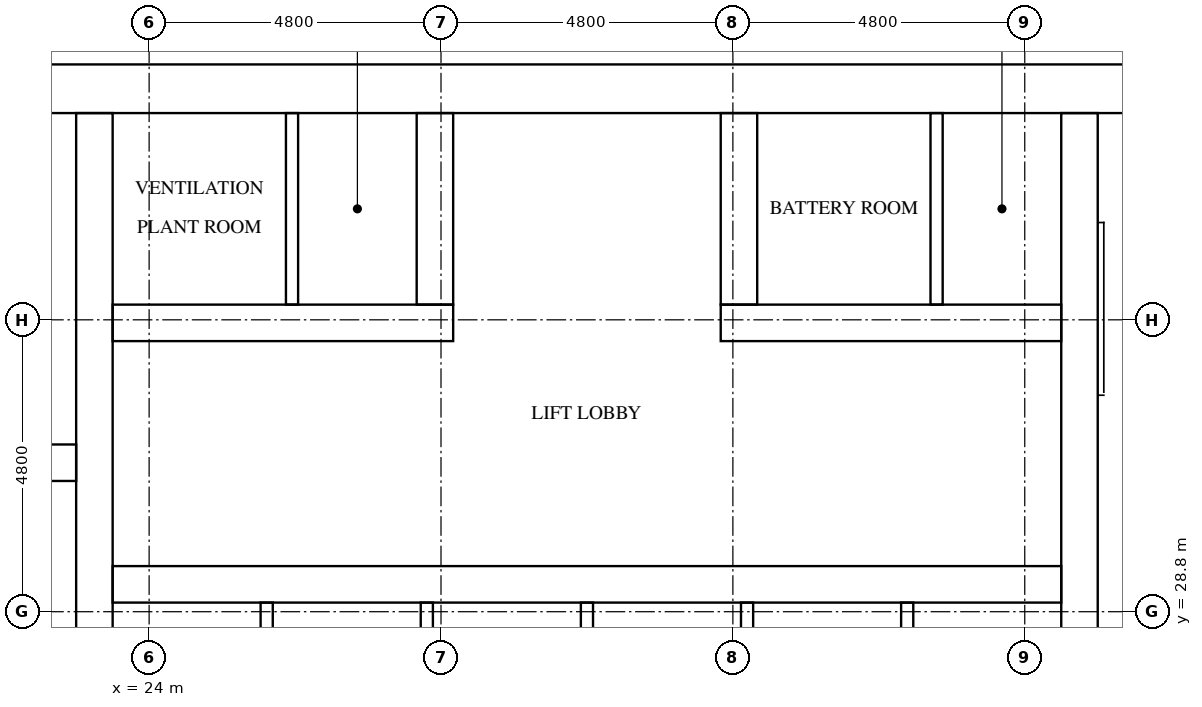
"""IFC4 building model, lengths in metres.
Left out: names, types, materials, properties, quantities, classifications, styles, units other than length and angle.
Written with IfcOpenShell. Run it as: python <this file> out.ifc"""

import sys

from ifc_helpers import new_model, si_unit, direction, frame, frame_2d, origin, place, context, subcontext, project, spatial, rectangle, extrude, element, fill, save


model = new_model("IFC4")
c1 = context("Model", 3, precision=1e-05, world=origin(), true_north=direction((0.0, 1.0)))
c2 = subcontext(c1, "Body", "Model", "MODEL_VIEW")
j1 = project(units=[si_unit("LENGTHUNIT", "METRE"), si_unit("PLANEANGLEUNIT", "RADIAN")], contexts=[c1])
p1 = place(None, origin())
s1 = spatial("IfcSite", under=j1, at=p1, CompositionType="ELEMENT")
p2 = place(p1, origin())
s2 = spatial("IfcBuilding", under=s1, at=p2, CompositionType="ELEMENT")
p3 = place(p2, frame((0.0, 0.0, 159.5)))
s3 = spatial("IfcBuildingStorey", under=s2, at=p3, CompositionType="ELEMENT", Elevation=159.5)
p4 = place(p3, frame((15.0, 37.4, 0.0), z_axis=(0.0, 0.0, 1.0), x_axis=(1.0, 0.0, 0.0)))
e1 = element("IfcWall", 1, at=p4, inside=s3, PredefinedType="SHEAR", context=c2, shape_type="SweptSolid", body=[
    extrude(rectangle(XDim=32.4, YDim=0.8, at=frame_2d((16.2, 0.0))), origin(), (0.0, 0.0, 1.0), 3.2),
])
p5 = place(p4, frame((15.3, 0.0, 0.0)))
e2 = element("IfcOpeningElement", 2, at=p5, cuts=e1, PredefinedType="OPENING", context=c2, shape_type="SweptSolid", body=[
    extrude(rectangle(XDim=1.8, YDim=2.1, at=frame_2d((0.9, 1.05))), frame((0.0, 0.41, 0.0), z_axis=(0.0, -1.0, 0.0), x_axis=(1.0, 0.0, 0.0)), (0.0, 0.0, 1.0), 0.82),
])
p6 = place(p4, frame((1.51, 0.0, 0.0)))
e3 = element("IfcOpeningElement", 3, at=p6, cuts=e1, PredefinedType="OPENING", context=c2, shape_type="SweptSolid", body=[
    extrude(rectangle(XDim=1.0, YDim=2.1, at=frame_2d((0.5, 1.05))), frame((0.0, 0.41, 0.0), z_axis=(0.0, -1.0, 0.0), x_axis=(1.0, 0.0, 0.0)), (0.0, 0.0, 1.0), 0.82),
])
p7 = place(p4, frame((5.11, 0.0, 0.0)))
e4 = element("IfcOpeningElement", 4, at=p7, cuts=e1, PredefinedType="OPENING", context=c2, shape_type="SweptSolid", body=[
    extrude(rectangle(XDim=1.0, YDim=2.1, at=frame_2d((0.5, 1.05))), frame((0.0, 0.41, 0.0), z_axis=(0.0, -1.0, 0.0), x_axis=(1.0, 0.0, 0.0)), (0.0, 0.0, 1.0), 0.82),
])
p8 = place(p3, frame((23.1, 15.8, 0.0), z_axis=(0.0, 0.0, 1.0), x_axis=(0.0, 1.0, 0.0)))
e5 = element("IfcWall", 5, at=p8, inside=s3, PredefinedType="SHEAR", context=c2, shape_type="SweptSolid", body=[
    extrude(rectangle(XDim=21.2, YDim=0.6, at=frame_2d((10.6, 0.0))), origin(), (0.0, 0.0, 1.0), 3.2),
])
p9 = place(p3, frame((39.3, 27.75, 0.0), z_axis=(0.0, 0.0, 1.0), x_axis=(0.0, 1.0, 0.0)))
e6 = element("IfcWall", 6, at=p9, inside=s3, PredefinedType="SHEAR", context=c2, shape_type="SweptSolid", body=[
    extrude(rectangle(XDim=9.25, YDim=0.6, at=frame_2d((4.625, 0.0))), origin(), (0.0, 0.0, 1.0), 3.2),
])
p10 = place(p3, frame((15.8, 31.25, 0.0), z_axis=(0.0, 0.0, 1.0), x_axis=(1.0, 0.0, 0.0)))
e7 = element("IfcWall", 7, at=p10, inside=s3, PredefinedType="SHEAR", context=c2, shape_type="SweptSolid", body=[
    extrude(rectangle(XDim=7.0, YDim=0.6, at=frame_2d((3.5, 0.0))), origin(), (0.0, 0.0, 1.0), 3.2),
])
p11 = place(p3, frame((23.4, 29.25, 0.0), z_axis=(0.0, 0.0, 1.0), x_axis=(1.0, 0.0, 0.0)))
e8 = element("IfcWall", 8, at=p11, inside=s3, PredefinedType="SHEAR", context=c2, shape_type="SweptSolid", body=[
    extrude(rectangle(XDim=15.6, YDim=0.6, at=frame_2d((7.8, 0.0))), origin(), (0.0, 0.0, 1.0), 3.2),
])
p12 = place(p11, frame((0.667, 0.0, 0.0)))
e9 = element("IfcOpeningElement", 9, at=p12, cuts=e8, PredefinedType="OPENING", context=c2, shape_type="SweptSolid", body=[
    extrude(rectangle(XDim=1.1, YDim=2.1, at=frame_2d((0.55, 1.05))), frame((0.0, 0.31, 0.0), z_axis=(0.0, -1.0, 0.0), x_axis=(1.0, 0.0, 0.0)), (0.0, 0.0, 1.0), 0.62),
])
p13 = place(p11, frame((3.3, 0.0, 0.0)))
e10 = element("IfcOpeningElement", 10, at=p13, cuts=e8, PredefinedType="OPENING", context=c2, shape_type="SweptSolid", body=[
    extrude(rectangle(XDim=1.1, YDim=2.1, at=frame_2d((0.55, 1.05))), frame((0.0, 0.31, 0.0), z_axis=(0.0, -1.0, 0.0), x_axis=(1.0, 0.0, 0.0)), (0.0, 0.0, 1.0), 0.62),
])
p14 = place(p11, frame((5.933, 0.0, 0.0)))
e11 = element("IfcOpeningElement", 11, at=p14, cuts=e8, PredefinedType="OPENING", context=c2, shape_type="SweptSolid", body=[
    extrude(rectangle(XDim=1.1, YDim=2.1, at=frame_2d((0.55, 1.05))), frame((0.0, 0.31, 0.0), z_axis=(0.0, -1.0, 0.0), x_axis=(1.0, 0.0, 0.0)), (0.0, 0.0, 1.0), 0.62),
])
p15 = place(p11, frame((8.567, 0.0, 0.0)))
e12 = element("IfcOpeningElement", 12, at=p15, cuts=e8, PredefinedType="OPENING", context=c2, shape_type="SweptSolid", body=[
    extrude(rectangle(XDim=1.1, YDim=2.1, at=frame_2d((0.55, 1.05))), frame((0.0, 0.31, 0.0), z_axis=(0.0, -1.0, 0.0), x_axis=(1.0, 0.0, 0.0)), (0.0, 0.0, 1.0), 0.62),
])
p16 = place(p11, frame((11.2, 0.0, 0.0)))
e13 = element("IfcOpeningElement", 13, at=p16, cuts=e8, PredefinedType="OPENING", context=c2, shape_type="SweptSolid", body=[
    extrude(rectangle(XDim=1.1, YDim=2.1, at=frame_2d((0.55, 1.05))), frame((0.0, 0.31, 0.0), z_axis=(0.0, -1.0, 0.0), x_axis=(1.0, 0.0, 0.0)), (0.0, 0.0, 1.0), 0.62),
])
p17 = place(p11, frame((13.833, 0.0, 0.0)))
e14 = element("IfcOpeningElement", 14, at=p17, cuts=e8, PredefinedType="OPENING", context=c2, shape_type="SweptSolid", body=[
    extrude(rectangle(XDim=1.1, YDim=2.1, at=frame_2d((0.55, 1.05))), frame((0.0, 0.31, 0.0), z_axis=(0.0, -1.0, 0.0), x_axis=(1.0, 0.0, 0.0)), (0.0, 0.0, 1.0), 0.62),
])
p18 = place(p3, frame((23.4, 33.55, 0.0), z_axis=(0.0, 0.0, 1.0), x_axis=(1.0, 0.0, 0.0)))
e15 = element("IfcWall", 15, at=p18, inside=s3, PredefinedType="SHEAR", context=c2, shape_type="SweptSolid", body=[
    extrude(rectangle(XDim=5.6, YDim=0.6, at=frame_2d((2.8, 0.0))), origin(), (0.0, 0.0, 1.0), 3.2),
])
p19 = place(p18, frame((0.925, 0.0, 0.0)))
e16 = element("IfcOpeningElement", 16, at=p19, cuts=e15, PredefinedType="OPENING", context=c2, shape_type="SweptSolid", body=[
    extrude(rectangle(XDim=1.0, YDim=2.1, at=frame_2d((0.5, 1.05))), frame((0.0, 0.31, 0.0), z_axis=(0.0, -1.0, 0.0), x_axis=(1.0, 0.0, 0.0)), (0.0, 0.0, 1.0), 0.62),
])
p20 = place(p18, frame((3.525, 0.0, 0.0)))
e17 = element("IfcOpeningElement", 17, at=p20, cuts=e15, PredefinedType="OPENING", context=c2, shape_type="SweptSolid", body=[
    extrude(rectangle(XDim=1.0, YDim=2.1, at=frame_2d((0.5, 1.05))), frame((0.0, 0.31, 0.0), z_axis=(0.0, -1.0, 0.0), x_axis=(1.0, 0.0, 0.0)), (0.0, 0.0, 1.0), 0.62),
])
p21 = place(p3, frame((33.4, 33.55, 0.0), z_axis=(0.0, 0.0, 1.0), x_axis=(1.0, 0.0, 0.0)))
e18 = element("IfcWall", 18, at=p21, inside=s3, PredefinedType="SHEAR", context=c2, shape_type="SweptSolid", body=[
    extrude(rectangle(XDim=5.6, YDim=0.6, at=frame_2d((2.8, 0.0))), origin(), (0.0, 0.0, 1.0), 3.2),
])
p22 = place(p21, frame((1.525, 0.0, 0.0)))
e19 = element("IfcOpeningElement", 19, at=p22, cuts=e18, PredefinedType="OPENING", context=c2, shape_type="SweptSolid", body=[
    extrude(rectangle(XDim=1.0, YDim=2.1, at=frame_2d((0.5, 1.05))), frame((0.0, 0.31, 0.0), z_axis=(0.0, -1.0, 0.0), x_axis=(1.0, 0.0, 0.0)), (0.0, 0.0, 1.0), 0.62),
])
p23 = place(p21, frame((4.125, 0.0, 0.0)))
e20 = element("IfcOpeningElement", 20, at=p23, cuts=e18, PredefinedType="OPENING", context=c2, shape_type="SweptSolid", body=[
    extrude(rectangle(XDim=1.0, YDim=2.1, at=frame_2d((0.5, 1.05))), frame((0.0, 0.31, 0.0), z_axis=(0.0, -1.0, 0.0), x_axis=(1.0, 0.0, 0.0)), (0.0, 0.0, 1.0), 0.62),
])
for number, where, z_axis, x_axis in (
    (21, (28.7, 33.85, 0.0), (0.0, 0.0, 1.0), (0.0, 1.0, 0.0)),
    (22, (33.7, 33.85, 0.0), (0.0, 0.0, 1.0), (0.0, 1.0, 0.0)),
):
    element("IfcWall", number, at=place(p3, frame(where, z_axis=z_axis, x_axis=x_axis)), inside=s3, PredefinedType="SHEAR", context=c2, shape_type="SweptSolid", body=[
        extrude(rectangle(XDim=3.15, YDim=0.6, at=frame_2d((1.575, 0.0))), origin(), (0.0, 0.0, 1.0), 3.2),
    ])
for number, where, z_axis, x_axis in (
    (23, (25.933, 26.45, 0.0), (0.0, 0.0, 1.0), (0.0, 1.0, 0.0)),
    (24, (28.567, 26.45, 0.0), (0.0, 0.0, 1.0), (0.0, 1.0, 0.0)),
    (25, (31.2, 26.45, 0.0), (0.0, 0.0, 1.0), (0.0, 1.0, 0.0)),
    (26, (33.833, 26.45, 0.0), (0.0, 0.0, 1.0), (0.0, 1.0, 0.0)),
    (27, (36.467, 26.45, 0.0), (0.0, 0.0, 1.0), (0.0, 1.0, 0.0)),
):
    element("IfcWall", number, at=place(p3, frame(where, z_axis=z_axis, x_axis=x_axis)), inside=s3, PredefinedType="SOLIDWALL", context=c2, shape_type="SweptSolid", body=[
        extrude(rectangle(XDim=2.5, YDim=0.2, at=frame_2d((1.25, 0.0))), origin(), (0.0, 0.0, 1.0), 3.2),
    ])
for number, where, z_axis, x_axis in (
    (28, (26.35, 33.85, 0.0), (0.0, 0.0, 1.0), (0.0, 1.0, 0.0)),
    (29, (36.95, 33.85, 0.0), (0.0, 0.0, 1.0), (0.0, 1.0, 0.0)),
):
    element("IfcWall", number, at=place(p3, frame(where, z_axis=z_axis, x_axis=x_axis)), inside=s3, PredefinedType="PARTITIONING", context=c2, shape_type="SweptSolid", body=[
        extrude(rectangle(XDim=3.15, YDim=0.2, at=frame_2d((1.575, 0.0))), origin(), (0.0, 0.0, 1.0), 3.2),
    ])
p24 = place(p12, origin())
e30 = element("IfcDoor", 30, at=p24, inside=s3, OperationType="DOUBLE_DOOR_SLIDING", PredefinedType="DOOR", context=c2, shape_type="SweptSolid", body=[
    extrude(rectangle(XDim=1.1, YDim=2.1, at=frame_2d((0.55, 1.05))), frame((0.0, 0.025, 0.0), z_axis=(0.0, -1.0, 0.0), x_axis=(1.0, 0.0, 0.0)), (0.0, 0.0, 1.0), 0.05),
])
fill(e9, e30)
p25 = place(p13, origin())
e31 = element("IfcDoor", 31, at=p25, inside=s3, OperationType="DOUBLE_DOOR_SLIDING", PredefinedType="DOOR", context=c2, shape_type="SweptSolid", body=[
    extrude(rectangle(XDim=1.1, YDim=2.1, at=frame_2d((0.55, 1.05))), frame((0.0, 0.025, 0.0), z_axis=(0.0, -1.0, 0.0), x_axis=(1.0, 0.0, 0.0)), (0.0, 0.0, 1.0), 0.05),
])
fill(e10, e31)
p26 = place(p14, origin())
e32 = element("IfcDoor", 32, at=p26, inside=s3, OperationType="DOUBLE_DOOR_SLIDING", PredefinedType="DOOR", context=c2, shape_type="SweptSolid", body=[
    extrude(rectangle(XDim=1.1, YDim=2.1, at=frame_2d((0.55, 1.05))), frame((0.0, 0.025, 0.0), z_axis=(0.0, -1.0, 0.0), x_axis=(1.0, 0.0, 0.0)), (0.0, 0.0, 1.0), 0.05),
])
fill(e11, e32)
p27 = place(p15, origin())
e33 = element("IfcDoor", 33, at=p27, inside=s3, OperationType="DOUBLE_DOOR_SLIDING", PredefinedType="DOOR", context=c2, shape_type="SweptSolid", body=[
    extrude(rectangle(XDim=1.1, YDim=2.1, at=frame_2d((0.55, 1.05))), frame((0.0, 0.025, 0.0), z_axis=(0.0, -1.0, 0.0), x_axis=(1.0, 0.0, 0.0)), (0.0, 0.0, 1.0), 0.05),
])
fill(e12, e33)
p28 = place(p16, origin())
e34 = element("IfcDoor", 34, at=p28, inside=s3, OperationType="DOUBLE_DOOR_SLIDING", PredefinedType="DOOR", context=c2, shape_type="SweptSolid", body=[
    extrude(rectangle(XDim=1.1, YDim=2.1, at=frame_2d((0.55, 1.05))), frame((0.0, 0.025, 0.0), z_axis=(0.0, -1.0, 0.0), x_axis=(1.0, 0.0, 0.0)), (0.0, 0.0, 1.0), 0.05),
])
fill(e13, e34)
p29 = place(p17, origin())
e35 = element("IfcDoor", 35, at=p29, inside=s3, OperationType="DOUBLE_DOOR_SLIDING", PredefinedType="DOOR", context=c2, shape_type="SweptSolid", body=[
    extrude(rectangle(XDim=1.1, YDim=2.1, at=frame_2d((0.55, 1.05))), frame((0.0, 0.025, 0.0), z_axis=(0.0, -1.0, 0.0), x_axis=(1.0, 0.0, 0.0)), (0.0, 0.0, 1.0), 0.05),
])
fill(e14, e35)
p30 = place(p5, origin())
e36 = element("IfcDoor", 36, at=p30, inside=s3, OperationType="DOUBLE_DOOR_SINGLE_SWING", PredefinedType="DOOR", context=c2, shape_type="SweptSolid", body=[
    extrude(rectangle(XDim=1.8, YDim=2.1, at=frame_2d((0.9, 1.05))), frame((0.0, 0.025, 0.0), z_axis=(0.0, -1.0, 0.0), x_axis=(1.0, 0.0, 0.0)), (0.0, 0.0, 1.0), 0.05),
])
fill(e2, e36)
p31 = place(p19, frame((1.0, 0.0, 0.0), z_axis=(0.0, 0.0, 1.0), x_axis=(-1.0, 0.0, 0.0)))
e37 = element("IfcDoor", 37, at=p31, inside=s3, OperationType="SINGLE_SWING_LEFT", PredefinedType="DOOR", context=c2, shape_type="SweptSolid", body=[
    extrude(rectangle(XDim=1.0, YDim=2.1, at=frame_2d((0.5, 1.05))), frame((0.0, 0.025, 0.0), z_axis=(0.0, -1.0, 0.0), x_axis=(1.0, 0.0, 0.0)), (0.0, 0.0, 1.0), 0.05),
])
fill(e16, e37)
p32 = place(p20, frame((1.0, 0.0, 0.0), z_axis=(0.0, 0.0, 1.0), x_axis=(-1.0, 0.0, 0.0)))
e38 = element("IfcDoor", 38, at=p32, inside=s3, OperationType="SINGLE_SWING_RIGHT", PredefinedType="DOOR", context=c2, shape_type="SweptSolid", body=[
    extrude(rectangle(XDim=1.0, YDim=2.1, at=frame_2d((0.5, 1.05))), frame((0.0, 0.025, 0.0), z_axis=(0.0, -1.0, 0.0), x_axis=(1.0, 0.0, 0.0)), (0.0, 0.0, 1.0), 0.05),
])
fill(e17, e38)
p33 = place(p22, frame((1.0, 0.0, 0.0), z_axis=(0.0, 0.0, 1.0), x_axis=(-1.0, 0.0, 0.0)))
e39 = element("IfcDoor", 39, at=p33, inside=s3, OperationType="SINGLE_SWING_LEFT", PredefinedType="DOOR", context=c2, shape_type="SweptSolid", body=[
    extrude(rectangle(XDim=1.0, YDim=2.1, at=frame_2d((0.5, 1.05))), frame((0.0, 0.025, 0.0), z_axis=(0.0, -1.0, 0.0), x_axis=(1.0, 0.0, 0.0)), (0.0, 0.0, 1.0), 0.05),
])
fill(e19, e39)
p34 = place(p23, frame((1.0, 0.0, 0.0), z_axis=(0.0, 0.0, 1.0), x_axis=(-1.0, 0.0, 0.0)))
e40 = element("IfcDoor", 40, at=p34, inside=s3, OperationType="SINGLE_SWING_RIGHT", PredefinedType="DOOR", context=c2, shape_type="SweptSolid", body=[
    extrude(rectangle(XDim=1.0, YDim=2.1, at=frame_2d((0.5, 1.05))), frame((0.0, 0.025, 0.0), z_axis=(0.0, -1.0, 0.0), x_axis=(1.0, 0.0, 0.0)), (0.0, 0.0, 1.0), 0.05),
])
fill(e20, e40)
save(model, sys.argv[1])
